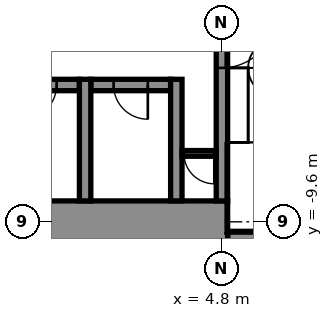
"""IFC4 building model, lengths in metres.
Left out: names, types, materials, properties, quantities, classifications, styles, units other than length and angle.
Written with IfcOpenShell. Run it as: python <this file> out.ifc"""

import sys

from ifc_helpers import new_model, si_unit, direction, frame, frame_2d, origin, place, context, subcontext, project, spatial, rectangle, extrude, element, fill, save


model = new_model("IFC4")
c1 = context("Model", 3, precision=1e-05, world=origin(), true_north=direction((0.0, 1.0)))
c2 = subcontext(c1, "Body", "Model", "MODEL_VIEW")
j1 = project(units=[si_unit("LENGTHUNIT", "METRE"), si_unit("PLANEANGLEUNIT", "RADIAN")], contexts=[c1])
p1 = place(None, origin())
s1 = spatial("IfcSite", under=j1, at=p1, CompositionType="ELEMENT")
p2 = place(p1, origin())
s2 = spatial("IfcBuilding", under=s1, at=p2, CompositionType="ELEMENT")
p3 = place(p2, frame((0.0, 0.0, 17.4)))
s3 = spatial("IfcBuildingStorey", under=s2, at=p3, CompositionType="ELEMENT", Elevation=17.4)
p4 = place(p3, frame((4.95, -10.0, -0.25), z_axis=(0.0, 0.0, 1.0), x_axis=(1.0, 0.0, 0.0)))
e1 = element("IfcWall", 1, at=p4, inside=s3, PredefinedType="STANDARD", context=c2, shape_type="SweptSolid", body=[
    extrude(rectangle(XDim=4.1, YDim=0.3, at=frame_2d((2.05, 0.0))), origin(), (0.0, 0.0, 1.0), 5.0),
])
p5 = place(p3, frame((-5.25, -9.6, -0.25), z_axis=(0.0, 0.0, 1.0), x_axis=(1.0, 0.0, 0.0)))
e2 = element("IfcWall", 2, at=p5, inside=s3, PredefinedType="SHEAR", context=c2, shape_type="SweptSolid", body=[
    extrude(rectangle(XDim=10.2, YDim=1.1, at=frame_2d((5.1, 0.0))), origin(), (0.0, 0.0, 1.0), 5.0),
])
p6 = place(p5, frame((0.6, 0.0, 0.25)))
e3 = element("IfcOpeningElement", 3, at=p6, cuts=e2, PredefinedType="OPENING", context=c2, shape_type="SweptSolid", body=[
    extrude(rectangle(XDim=0.9, YDim=2.1, at=frame_2d((0.45, 1.05))), frame((0.0, 0.56, 0.0), z_axis=(0.0, -1.0, 0.0), x_axis=(1.0, 0.0, 0.0)), (0.0, 0.0, 1.0), 1.12),
])
p7 = place(p3, frame((-1.05, -6.0, -0.25), z_axis=(0.0, 0.0, 1.0), x_axis=(1.0, 0.0, 0.0)))
e4 = element("IfcWall", 4, at=p7, inside=s3, PredefinedType="STANDARD", context=c2, shape_type="SweptSolid", body=[
    extrude(rectangle(XDim=2.1, YDim=0.3, at=frame_2d((1.05, 0.0))), origin(), (0.0, 0.0, 1.0), 5.0),
])
p8 = place(p7, frame((0.6, 0.0, 0.25)))
e5 = element("IfcOpeningElement", 5, at=p8, cuts=e4, PredefinedType="OPENING", context=c2, shape_type="SweptSolid", body=[
    extrude(rectangle(XDim=0.9, YDim=2.1, at=frame_2d((0.45, 1.05))), frame((0.0, 0.16, 0.0), z_axis=(0.0, -1.0, 0.0), x_axis=(1.0, 0.0, 0.0)), (0.0, 0.0, 1.0), 0.32),
])
p9 = place(p3, frame((1.35, -6.0, -0.25), z_axis=(0.0, 0.0, 1.0), x_axis=(1.0, 0.0, 0.0)))
e6 = element("IfcWall", 6, at=p9, inside=s3, PredefinedType="STANDARD", context=c2, shape_type="SweptSolid", body=[
    extrude(rectangle(XDim=2.1, YDim=0.3, at=frame_2d((1.05, 0.0))), origin(), (0.0, 0.0, 1.0), 5.0),
])
p10 = place(p9, frame((0.6, 0.0, 0.25)))
e7 = element("IfcOpeningElement", 7, at=p10, cuts=e6, PredefinedType="OPENING", context=c2, shape_type="SweptSolid", body=[
    extrude(rectangle(XDim=0.9, YDim=2.1, at=frame_2d((0.45, 1.05))), frame((0.0, 0.16, 0.0), z_axis=(0.0, -1.0, 0.0), x_axis=(1.0, 0.0, 0.0)), (0.0, 0.0, 1.0), 0.32),
])
for number, where, z_axis, x_axis in (
    (8, (1.2, -9.05, -0.25), (0.0, 0.0, 1.0), (0.0, 1.0, 0.0)),
    (9, (3.6, -9.05, -0.25), (0.0, 0.0, 1.0), (0.0, 1.0, 0.0)),
):
    element("IfcWall", number, at=place(p3, frame(where, z_axis=z_axis, x_axis=x_axis)), inside=s3, PredefinedType="STANDARD", context=c2, shape_type="SweptSolid", body=[
        extrude(rectangle(XDim=3.2, YDim=0.3, at=frame_2d((1.6, 0.0))), origin(), (0.0, 0.0, 1.0), 5.0),
    ])
p11 = place(p3, frame((4.8, -9.05, -0.25), z_axis=(0.0, 0.0, 1.0), x_axis=(0.0, 1.0, 0.0)))
e10 = element("IfcWall", 10, at=p11, inside=s3, PredefinedType="STANDARD", context=c2, shape_type="SweptSolid", body=[
    extrude(rectangle(XDim=6.8, YDim=0.3, at=frame_2d((3.4, 0.0))), origin(), (0.0, 0.0, 1.0), 5.0),
])
p12 = place(p11, frame((3.5, 0.0, 0.25)))
e11 = element("IfcOpeningElement", 11, at=p12, cuts=e10, PredefinedType="OPENING", context=c2, shape_type="SweptSolid", body=[
    extrude(rectangle(XDim=1.4, YDim=2.1, at=frame_2d((0.7, 1.05))), frame((0.0, 0.16, 0.0), z_axis=(0.0, -1.0, 0.0), x_axis=(1.0, 0.0, 0.0)), (0.0, 0.0, 1.0), 0.32),
])
p13 = place(p3, frame((3.75, -7.8, 0.0), z_axis=(0.0, 0.0, 1.0), x_axis=(1.0, 0.0, 0.0)))
e12 = element("IfcWall", 12, at=p13, inside=s3, PredefinedType="PARTITIONING", context=c2, shape_type="SweptSolid", body=[
    extrude(rectangle(XDim=0.9, YDim=0.15, at=frame_2d((0.45, 0.0))), origin(), (0.0, 0.0, 1.0), 4.75),
])
p14 = place(p13, frame((0.05, 0.0, 0.0)))
e13 = element("IfcOpeningElement", 13, at=p14, cuts=e12, PredefinedType="OPENING", context=c2, shape_type="SweptSolid", body=[
    extrude(rectangle(XDim=0.8, YDim=2.1, at=frame_2d((0.4, 1.05))), frame((0.0, 0.085, 0.0), z_axis=(0.0, -1.0, 0.0), x_axis=(1.0, 0.0, 0.0)), (0.0, 0.0, 1.0), 0.17),
])
p15 = place(p14, frame((0.8, 0.0, 0.0), z_axis=(0.0, 0.0, 1.0), x_axis=(-1.0, 0.0, 0.0)))
e14 = element("IfcDoor", 14, at=p15, inside=s3, OperationType="SINGLE_SWING_RIGHT", PredefinedType="DOOR", context=c2, shape_type="SweptSolid", body=[
    extrude(rectangle(XDim=0.8, YDim=2.1, at=frame_2d((0.4, 1.05))), frame((0.0, 0.025, 0.0), z_axis=(0.0, -1.0, 0.0), x_axis=(1.0, 0.0, 0.0)), (0.0, 0.0, 1.0), 0.05),
])
fill(e13, e14)
p16 = place(p12, frame((1.4, 0.0, 0.0), z_axis=(0.0, 0.0, 1.0), x_axis=(-1.0, 0.0, 0.0)))
e15 = element("IfcDoor", 15, at=p16, inside=s3, OperationType="SINGLE_SWING_RIGHT", PredefinedType="DOOR", context=c2, shape_type="SweptSolid", body=[
    extrude(rectangle(XDim=1.4, YDim=2.1, at=frame_2d((0.7, 1.05))), frame((0.0, 0.025, 0.0), z_axis=(0.0, -1.0, 0.0), x_axis=(1.0, 0.0, 0.0)), (0.0, 0.0, 1.0), 0.05),
])
fill(e11, e15)
p17 = place(p8, frame((0.9, 0.0, 0.0), z_axis=(0.0, 0.0, 1.0), x_axis=(-1.0, 0.0, 0.0)))
e16 = element("IfcDoor", 16, at=p17, inside=s3, OperationType="SINGLE_SWING_LEFT", PredefinedType="DOOR", context=c2, shape_type="SweptSolid", body=[
    extrude(rectangle(XDim=0.9, YDim=2.1, at=frame_2d((0.45, 1.05))), frame((0.0, 0.025, 0.0), z_axis=(0.0, -1.0, 0.0), x_axis=(1.0, 0.0, 0.0)), (0.0, 0.0, 1.0), 0.05),
])
fill(e5, e16)
p18 = place(p10, frame((0.9, 0.0, 0.0), z_axis=(0.0, 0.0, 1.0), x_axis=(-1.0, 0.0, 0.0)))
e17 = element("IfcDoor", 17, at=p18, inside=s3, OperationType="SINGLE_SWING_RIGHT", PredefinedType="DOOR", context=c2, shape_type="SweptSolid", body=[
    extrude(rectangle(XDim=0.9, YDim=2.1, at=frame_2d((0.45, 1.05))), frame((0.0, 0.025, 0.0), z_axis=(0.0, -1.0, 0.0), x_axis=(1.0, 0.0, 0.0)), (0.0, 0.0, 1.0), 0.05),
])
fill(e7, e17)
save(model, sys.argv[1])
